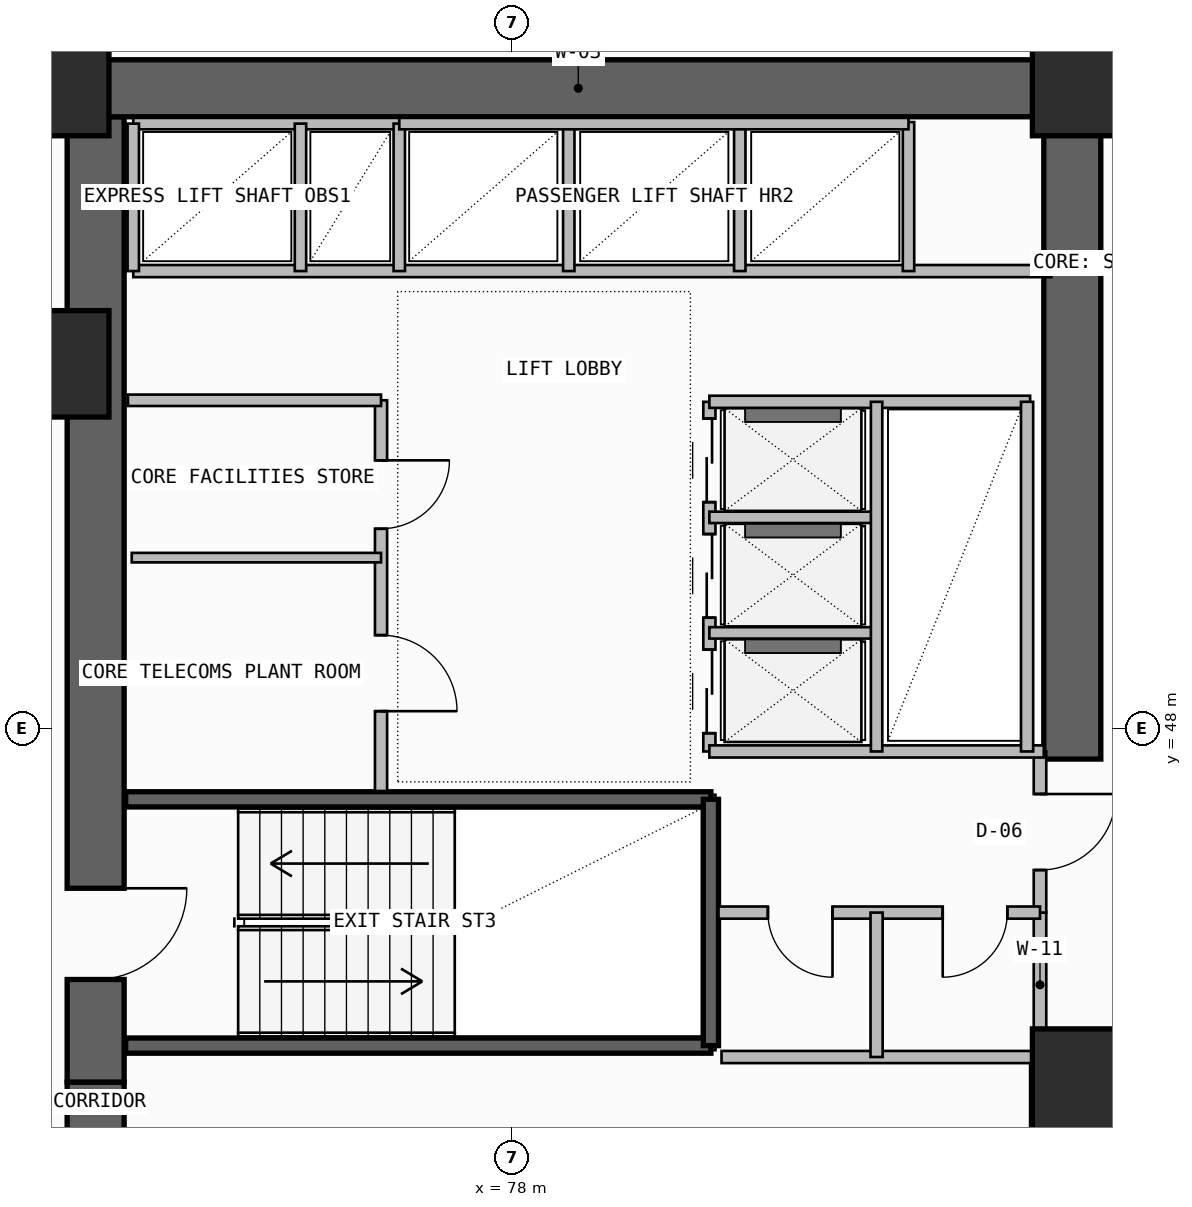
"""IFC4 building model, lengths in metres.
Left out: names, types, materials, properties, quantities, classifications, styles, units other than length and angle.
Written with IfcOpenShell. Run it as: python <this file> out.ifc"""

import sys

from ifc_helpers import new_model, si_unit, direction, frame, frame_2d, origin, origin_2d, place, context, subcontext, project, spatial, rectangle, extrude, element, fill, save


model = new_model("IFC4")
c1 = context("Model", 3, precision=1e-05, world=origin(), true_north=direction((0.0, 1.0)))
c2 = subcontext(c1, "Body", "Model", "MODEL_VIEW")
j1 = project(units=[si_unit("LENGTHUNIT", "METRE"), si_unit("PLANEANGLEUNIT", "RADIAN")], contexts=[c1])
p1 = place(None, origin())
s1 = spatial("IfcSite", under=j1, at=p1, CompositionType="ELEMENT")
p2 = place(p1, origin())
s2 = spatial("IfcBuilding", under=s1, at=p2, CompositionType="ELEMENT")
p3 = place(p2, frame((0.0, 0.0, 164.7)))
s3 = spatial("IfcBuildingStorey", under=s2, at=p3, CompositionType="ELEMENT", Elevation=164.7)
p4 = place(p3, frame((72.525, 35.5, -0.4), z_axis=(0.0, 0.0, 1.0), x_axis=(0.0, 1.0, 0.0)))
e1 = element("IfcWall", 1, at=p4, inside=s3, PredefinedType="SHEAR", context=c2, shape_type="SweptSolid", body=[
    extrude(rectangle(XDim=7.85, YDim=0.75, at=frame_2d((3.925, 0.0))), origin(), (0.0, 0.0, 1.0), 3.74),
])
p5 = place(p4, frame((1.45, 0.0, 0.4)))
e2 = element("IfcOpeningElement", 2, at=p5, cuts=e1, PredefinedType="OPENING", context=c2, shape_type="SweptSolid", body=[
    extrude(rectangle(XDim=1.2, YDim=2.2, at=frame_2d((0.6, 1.1))), frame((0.0, 0.385, 0.0), z_axis=(0.0, -1.0, 0.0), x_axis=(1.0, 0.0, 0.0)), (0.0, 0.0, 1.0), 0.77),
])
p6 = place(p3, frame((72.525, 43.35, -0.4), z_axis=(0.0, 0.0, 1.0), x_axis=(0.0, 1.0, 0.0)))
e3 = element("IfcWall", 3, at=p6, inside=s3, PredefinedType="SHEAR", context=c2, shape_type="SweptSolid", body=[
    extrude(rectangle(XDim=12.7, YDim=0.75, at=frame_2d((6.35, 0.0))), origin(), (0.0, 0.0, 1.0), 3.74),
])
p7 = place(p6, frame((1.35, 0.0, 0.4)))
e4 = element("IfcOpeningElement", 4, at=p7, cuts=e3, PredefinedType="OPENING", context=c2, shape_type="SweptSolid", body=[
    extrude(rectangle(XDim=1.2, YDim=2.2, at=frame_2d((0.6, 1.1))), frame((0.0, 0.385, 0.0), z_axis=(0.0, -1.0, 0.0), x_axis=(1.0, 0.0, 0.0)), (0.0, 0.0, 1.0), 0.77),
])
p8 = place(p3, frame((72.0, 56.425, -0.4), z_axis=(0.0, 0.0, 1.0), x_axis=(1.0, 0.0, 0.0)))
e5 = element("IfcWall", 5, at=p8, inside=s3, PredefinedType="SHEAR", context=c2, shape_type="SweptSolid", body=[
    extrude(rectangle(XDim=13.75, YDim=0.75, at=frame_2d((6.875, 0.0))), origin(), (0.0, 0.0, 1.0), 3.74),
])
p9 = place(p3, frame((85.375, 47.6, -0.4), z_axis=(0.0, 0.0, 1.0), x_axis=(0.0, 1.0, 0.0)))
e6 = element("IfcWall", 6, at=p9, inside=s3, PredefinedType="SHEAR", context=c2, shape_type="SweptSolid", body=[
    extrude(rectangle(XDim=8.45, YDim=0.75, at=frame_2d((4.225, 0.0))), origin(), (0.0, 0.0, 1.0), 3.74),
])
for number, where, z_axis, x_axis in (
    (7, (85.55, 43.35, 0.0), (0.0, 0.0, 1.0), (1.0, 0.0, 0.0)),
    (8, (72.0, 52.8, 0.0), (0.0, 0.0, 1.0), (1.0, 0.0, 0.0)),
    (9, (72.0, 56.5, 0.0), (0.0, 0.0, 1.0), (1.0, 0.0, 0.0)),
    (10, (85.55, 56.5, 0.0), (0.0, 0.0, 1.0), (1.0, 0.0, 0.0)),
):
    element("IfcColumn", number, at=place(p3, frame(where, z_axis=z_axis, x_axis=x_axis)), inside=s3, PredefinedType="COLUMN", context=c2, shape_type="SweptSolid", body=[
        extrude(rectangle(XDim=1.4, YDim=1.4, at=origin_2d()), origin(), (0.0, 0.0, 1.0), 3.6),
    ])
p10 = place(p3, frame((84.92, 38.85, 0.0), z_axis=(0.0, 0.0, 1.0), x_axis=(0.0, 1.0, 0.0)))
e11 = element("IfcWall", 11, at=p10, inside=s3, PredefinedType="SOLIDWALL", context=c2, shape_type="SweptSolid", body=[
    extrude(rectangle(XDim=4.83, YDim=0.2, at=frame_2d((2.415, 0.0))), origin(), (0.0, 0.0, 1.0), 3.34),
])
p11 = place(p10, frame((1.25, 0.0, 0.0)))
e12 = element("IfcOpeningElement", 12, at=p11, cuts=e11, PredefinedType="OPENING", context=c2, shape_type="SweptSolid", body=[
    extrude(rectangle(XDim=1.1, YDim=2.2, at=frame_2d((0.55, 1.1))), frame((0.0, 0.11, 0.0), z_axis=(0.0, -1.0, 0.0), x_axis=(1.0, 0.0, 0.0)), (0.0, 0.0, 1.0), 0.22),
])
for number, where, z_axis, x_axis in (
    (13, (72.92, 43.83, -0.4), (0.0, 0.0, 1.0), (1.0, 0.0, 0.0)),
    (14, (72.92, 47.07, -0.4), (0.0, 0.0, 1.0), (1.0, 0.0, 0.0)),
):
    element("IfcWall", number, at=place(p3, frame(where, z_axis=z_axis, x_axis=x_axis)), inside=s3, PredefinedType="SOLIDWALL", context=c2, shape_type="SweptSolid", body=[
        extrude(rectangle(XDim=7.7, YDim=0.2, at=frame_2d((3.85, 0.0))), origin(), (0.0, 0.0, 1.0), 3.74),
    ])
p12 = place(p3, frame((80.62, 43.83, -0.4), z_axis=(0.0, 0.0, 1.0), x_axis=(0.0, 1.0, 0.0)))
e15 = element("IfcWall", 15, at=p12, inside=s3, PredefinedType="SOLIDWALL", context=c2, shape_type="SweptSolid", body=[
    extrude(rectangle(XDim=3.24, YDim=0.2, at=frame_2d((1.62, 0.0))), origin(), (0.0, 0.0, 1.0), 3.74),
])
p13 = place(p3, frame((84.95, 43.68, 0.0), z_axis=(0.0, 0.0, 1.0), x_axis=(0.0, 1.0, 0.0)))
e16 = element("IfcWall", 16, at=p13, inside=s3, PredefinedType="PLUMBINGWALL", context=c2, shape_type="SweptSolid", body=[
    extrude(rectangle(XDim=1.9, YDim=0.165, at=frame_2d((0.95, 0.0))), origin(), (0.0, 0.0, 1.0), 3.34),
])
p14 = place(p3, frame((84.95, 45.58, 0.0), z_axis=(0.0, 0.0, 1.0), x_axis=(0.0, 1.0, 0.0)))
e17 = element("IfcWall", 17, at=p14, inside=s3, PredefinedType="PARTITIONING", context=c2, shape_type="SweptSolid", body=[
    extrude(rectangle(XDim=2.12, YDim=0.165, at=frame_2d((1.06, 0.0))), origin(), (0.0, 0.0, 1.0), 3.34),
])
p15 = place(p14, frame((0.56, 0.0, 0.0)))
e18 = element("IfcOpeningElement", 18, at=p15, cuts=e17, PredefinedType="OPENING", context=c2, shape_type="SweptSolid", body=[
    extrude(rectangle(XDim=1.0, YDim=2.2, at=frame_2d((0.5, 1.1))), frame((0.0, 0.093, 0.0), z_axis=(0.0, -1.0, 0.0), x_axis=(1.0, 0.0, 0.0)), (0.0, 0.0, 1.0), 0.185),
])
p16 = place(p3, frame((80.72, 45.58, 0.0), z_axis=(0.0, 0.0, 1.0), x_axis=(1.0, 0.0, 0.0)))
e19 = element("IfcWall", 19, at=p16, inside=s3, PredefinedType="PLUMBINGWALL", context=c2, shape_type="SweptSolid", body=[
    extrude(rectangle(XDim=4.23, YDim=0.16, at=frame_2d((2.115, 0.0))), origin(), (0.0, 0.0, 1.0), 3.34),
])
p17 = place(p16, frame((0.65, 0.0, 0.0)))
e20 = element("IfcOpeningElement", 20, at=p17, cuts=e19, PredefinedType="OPENING", context=c2, shape_type="SweptSolid", body=[
    extrude(rectangle(XDim=0.85, YDim=2.05, at=frame_2d((0.425, 1.025))), frame((0.0, 0.09, 0.0), z_axis=(0.0, -1.0, 0.0), x_axis=(1.0, 0.0, 0.0)), (0.0, 0.0, 1.0), 0.18),
])
p18 = place(p16, frame((2.95, 0.0, 0.0)))
e21 = element("IfcOpeningElement", 21, at=p18, cuts=e19, PredefinedType="OPENING", context=c2, shape_type="SweptSolid", body=[
    extrude(rectangle(XDim=0.85, YDim=2.05, at=frame_2d((0.425, 1.025))), frame((0.0, 0.09, 0.0), z_axis=(0.0, -1.0, 0.0), x_axis=(1.0, 0.0, 0.0)), (0.0, 0.0, 1.0), 0.18),
])
p19 = place(p3, frame((80.76, 43.68, 0.0), z_axis=(0.0, 0.0, 1.0), x_axis=(1.0, 0.0, 0.0)))
e22 = element("IfcWall", 22, at=p19, inside=s3, PredefinedType="PLUMBINGWALL", context=c2, shape_type="SweptSolid", body=[
    extrude(rectangle(XDim=4.19, YDim=0.16, at=frame_2d((2.095, 0.0))), origin(), (0.0, 0.0, 1.0), 3.34),
])
p20 = place(p3, frame((82.8, 43.68, 0.0), z_axis=(0.0, 0.0, 1.0), x_axis=(0.0, 1.0, 0.0)))
e23 = element("IfcWall", 23, at=p20, inside=s3, PredefinedType="PLUMBINGWALL", context=c2, shape_type="SweptSolid", body=[
    extrude(rectangle(XDim=1.9, YDim=0.16, at=frame_2d((0.95, 0.0))), origin(), (0.0, 0.0, 1.0), 3.34),
])
p21 = place(p3, frame((76.28, 47.18, 0.0), z_axis=(0.0, 0.0, 1.0), x_axis=(0.0, 1.0, 0.0)))
e24 = element("IfcWall", 24, at=p21, inside=s3, PredefinedType="SOLIDWALL", context=c2, shape_type="SweptSolid", body=[
    extrude(rectangle(XDim=5.14, YDim=0.16, at=frame_2d((2.57, 0.0))), origin(), (0.0, 0.0, 1.0), 3.34),
])
p22 = place(p21, frame((1.05, 0.0, 0.0)))
e25 = element("IfcOpeningElement", 25, at=p22, cuts=e24, PredefinedType="OPENING", context=c2, shape_type="SweptSolid", body=[
    extrude(rectangle(XDim=1.0, YDim=2.2, at=frame_2d((0.5, 1.1))), frame((0.0, 0.09, 0.0), z_axis=(0.0, -1.0, 0.0), x_axis=(1.0, 0.0, 0.0)), (0.0, 0.0, 1.0), 0.18),
])
p23 = place(p21, frame((3.45, 0.0, 0.0)))
e26 = element("IfcOpeningElement", 26, at=p23, cuts=e24, PredefinedType="OPENING", context=c2, shape_type="SweptSolid", body=[
    extrude(rectangle(XDim=0.9, YDim=2.1, at=frame_2d((0.45, 1.05))), frame((0.0, 0.09, 0.0), z_axis=(0.0, -1.0, 0.0), x_axis=(1.0, 0.0, 0.0)), (0.0, 0.0, 1.0), 0.18),
])
p24 = place(p3, frame((72.95, 52.32, 0.0), z_axis=(0.0, 0.0, 1.0), x_axis=(1.0, 0.0, 0.0)))
e27 = element("IfcWall", 27, at=p24, inside=s3, PredefinedType="SOLIDWALL", context=c2, shape_type="SweptSolid", body=[
    extrude(rectangle(XDim=3.33, YDim=0.15, at=frame_2d((1.665, 0.0))), origin(), (0.0, 0.0, 1.0), 3.34),
])
p25 = place(p3, frame((73.0, 50.25, 0.0), z_axis=(0.0, 0.0, 1.0), x_axis=(1.0, 0.0, 0.0)))
e28 = element("IfcWall", 28, at=p25, inside=s3, PredefinedType="PARTITIONING", context=c2, shape_type="SweptSolid", body=[
    extrude(rectangle(XDim=3.28, YDim=0.125, at=frame_2d((1.64, 0.0))), origin(), (0.0, 0.0, 1.0), 3.34),
])
p26 = place(p3, frame((80.6, 47.7, 0.0), z_axis=(0.0, 0.0, 1.0), x_axis=(0.0, 1.0, 0.0)))
e29 = element("IfcWall", 29, at=p26, inside=s3, PredefinedType="SOLIDWALL", context=c2, shape_type="SweptSolid", body=[
    extrude(rectangle(XDim=4.6, YDim=0.16, at=frame_2d((2.3, 0.0))), origin(), (0.0, 0.0, 1.0), 3.34),
])
p27 = place(p26, frame((0.24, 0.0, 0.0)))
e30 = element("IfcOpeningElement", 30, at=p27, cuts=e29, PredefinedType="OPENING", context=c2, shape_type="SweptSolid", body=[
    extrude(rectangle(XDim=1.1, YDim=2.25, at=frame_2d((0.55, 1.125))), frame((0.0, 0.09, 0.0), z_axis=(0.0, -1.0, 0.0), x_axis=(1.0, 0.0, 0.0)), (0.0, 0.0, 1.0), 0.18),
])
p28 = place(p26, frame((1.76, 0.0, 0.0)))
e31 = element("IfcOpeningElement", 31, at=p28, cuts=e29, PredefinedType="OPENING", context=c2, shape_type="SweptSolid", body=[
    extrude(rectangle(XDim=1.1, YDim=2.25, at=frame_2d((0.55, 1.125))), frame((0.0, 0.09, 0.0), z_axis=(0.0, -1.0, 0.0), x_axis=(1.0, 0.0, 0.0)), (0.0, 0.0, 1.0), 0.18),
])
p29 = place(p26, frame((3.28, 0.0, 0.0)))
e32 = element("IfcOpeningElement", 32, at=p29, cuts=e29, PredefinedType="OPENING", context=c2, shape_type="SweptSolid", body=[
    extrude(rectangle(XDim=1.1, YDim=2.25, at=frame_2d((0.55, 1.125))), frame((0.0, 0.09, 0.0), z_axis=(0.0, -1.0, 0.0), x_axis=(1.0, 0.0, 0.0)), (0.0, 0.0, 1.0), 0.18),
])
p30 = place(p3, frame((80.6, 47.7, 0.0), z_axis=(0.0, 0.0, 1.0), x_axis=(1.0, 0.0, 0.0)))
e33 = element("IfcWall", 33, at=p30, inside=s3, PredefinedType="SOLIDWALL", context=c2, shape_type="SweptSolid", body=[
    extrude(rectangle(XDim=4.4, YDim=0.16, at=frame_2d((2.2, 0.0))), origin(), (0.0, 0.0, 1.0), 3.34),
])
p31 = place(p3, frame((80.6, 52.3, 0.0), z_axis=(0.0, 0.0, 1.0), x_axis=(1.0, 0.0, 0.0)))
e34 = element("IfcWall", 34, at=p31, inside=s3, PredefinedType="SOLIDWALL", context=c2, shape_type="SweptSolid", body=[
    extrude(rectangle(XDim=4.22, YDim=0.16, at=frame_2d((2.11, 0.0))), origin(), (0.0, 0.0, 1.0), 3.34),
])
for number, where, z_axis, x_axis in (
    (35, (80.6, 49.26, 0.0), (0.0, 0.0, 1.0), (1.0, 0.0, 0.0)),
    (36, (80.6, 50.78, 0.0), (0.0, 0.0, 1.0), (1.0, 0.0, 0.0)),
):
    element("IfcWall", number, at=place(p3, frame(where, z_axis=z_axis, x_axis=x_axis)), inside=s3, PredefinedType="PLUMBINGWALL", context=c2, shape_type="SweptSolid", body=[
        extrude(rectangle(XDim=2.2, YDim=0.15, at=frame_2d((1.1, 0.0))), origin(), (0.0, 0.0, 1.0), 3.34),
    ])
p32 = place(p3, frame((82.8, 47.7, 0.0), z_axis=(0.0, 0.0, 1.0), x_axis=(0.0, 1.0, 0.0)))
e37 = element("IfcWall", 37, at=p32, inside=s3, PredefinedType="PLUMBINGWALL", context=c2, shape_type="SweptSolid", body=[
    extrude(rectangle(XDim=4.6, YDim=0.15, at=frame_2d((2.3, 0.0))), origin(), (0.0, 0.0, 1.0), 3.34),
])
p33 = place(p3, frame((84.78, 47.7, 0.0), z_axis=(0.0, 0.0, 1.0), x_axis=(0.0, 1.0, 0.0)))
e38 = element("IfcWall", 38, at=p33, inside=s3, PredefinedType="SOLIDWALL", context=c2, shape_type="SweptSolid", body=[
    extrude(rectangle(XDim=4.6, YDim=0.16, at=frame_2d((2.3, 0.0))), origin(), (0.0, 0.0, 1.0), 3.34),
])
p34 = place(p3, frame((73.02, 54.02, 0.0), z_axis=(0.0, 0.0, 1.0), x_axis=(1.0, 0.0, 0.0)))
e39 = element("IfcWall", 39, at=p34, inside=s3, PredefinedType="SOLIDWALL", context=c2, shape_type="SweptSolid", body=[
    extrude(rectangle(XDim=12.08, YDim=0.16, at=frame_2d((6.04, 0.0))), origin(), (0.0, 0.0, 1.0), 3.34),
])
p35 = place(p3, frame((73.02, 55.96, 0.0), z_axis=(0.0, 0.0, 1.0), x_axis=(1.0, 0.0, 0.0)))
e40 = element("IfcWall", 40, at=p35, inside=s3, PredefinedType="SOLIDWALL", context=c2, shape_type="SweptSolid", body=[
    extrude(rectangle(XDim=3.5, YDim=0.15, at=frame_2d((1.75, 0.0))), origin(), (0.0, 0.0, 1.0), 3.34),
])
p36 = place(p3, frame((73.02, 54.02, 0.0), z_axis=(0.0, 0.0, 1.0), x_axis=(0.0, 1.0, 0.0)))
e41 = element("IfcWall", 41, at=p36, inside=s3, PredefinedType="PLUMBINGWALL", context=c2, shape_type="SweptSolid", body=[
    extrude(rectangle(XDim=1.94, YDim=0.15, at=frame_2d((0.97, 0.0))), origin(), (0.0, 0.0, 1.0), 3.34),
])
p37 = place(p3, frame((76.52, 54.02, 0.0), z_axis=(0.0, 0.0, 1.0), x_axis=(0.0, 1.0, 0.0)))
e42 = element("IfcWall", 42, at=p37, inside=s3, PredefinedType="SOLIDWALL", context=c2, shape_type="SweptSolid", body=[
    extrude(rectangle(XDim=1.94, YDim=0.15, at=frame_2d((0.97, 0.0))), origin(), (0.0, 0.0, 1.0), 3.34),
])
p38 = place(p3, frame((75.22, 54.02, 0.0), z_axis=(0.0, 0.0, 1.0), x_axis=(0.0, 1.0, 0.0)))
e43 = element("IfcWall", 43, at=p38, inside=s3, PredefinedType="PLUMBINGWALL", context=c2, shape_type="SweptSolid", body=[
    extrude(rectangle(XDim=1.94, YDim=0.15, at=frame_2d((0.97, 0.0))), origin(), (0.0, 0.0, 1.0), 3.34),
])
for number, where, z_axis, x_axis in (
    (44, (78.75, 54.02, 0.0), (0.0, 0.0, 1.0), (0.0, 1.0, 0.0)),
    (45, (81.0, 54.02, 0.0), (0.0, 0.0, 1.0), (0.0, 1.0, 0.0)),
):
    element("IfcWall", number, at=place(p3, frame(where, z_axis=z_axis, x_axis=x_axis)), inside=s3, PredefinedType="PLUMBINGWALL", context=c2, shape_type="SweptSolid", body=[
        extrude(rectangle(XDim=1.96, YDim=0.15, at=frame_2d((0.98, 0.0))), origin(), (0.0, 0.0, 1.0), 3.34),
    ])
p39 = place(p3, frame((83.22, 54.02, 0.0), z_axis=(0.0, 0.0, 1.0), x_axis=(0.0, 1.0, 0.0)))
e46 = element("IfcWall", 46, at=p39, inside=s3, PredefinedType="SOLIDWALL", context=c2, shape_type="SweptSolid", body=[
    extrude(rectangle(XDim=1.96, YDim=0.15, at=frame_2d((0.98, 0.0))), origin(), (0.0, 0.0, 1.0), 3.34),
])
p40 = place(p3, frame((76.52, 55.96, 0.0), z_axis=(0.0, 0.0, 1.0), x_axis=(1.0, 0.0, 0.0)))
e47 = element("IfcWall", 47, at=p40, inside=s3, PredefinedType="SOLIDWALL", context=c2, shape_type="SweptSolid", body=[
    extrude(rectangle(XDim=6.7, YDim=0.15, at=frame_2d((3.35, 0.0))), origin(), (0.0, 0.0, 1.0), 3.34),
])
p41 = place(p7, frame((1.2, 0.0, 0.0), z_axis=(0.0, 0.0, 1.0), x_axis=(-1.0, 0.0, 0.0)))
e48 = element("IfcDoor", 48, at=p41, inside=s3, OperationType="SINGLE_SWING_LEFT", PredefinedType="USERDEFINED", context=c2, shape_type="SweptSolid", body=[
    extrude(rectangle(XDim=1.2, YDim=2.2, at=frame_2d((0.6, 1.1))), frame((0.0, 0.025, 0.0), z_axis=(0.0, -1.0, 0.0), x_axis=(1.0, 0.0, 0.0)), (0.0, 0.0, 1.0), 0.05),
])
fill(e4, e48)
p42 = place(p15, frame((1.0, 0.0, 0.0), z_axis=(0.0, 0.0, 1.0), x_axis=(-1.0, 0.0, 0.0)))
e49 = element("IfcDoor", 49, at=p42, inside=s3, OperationType="SINGLE_SWING_LEFT", PredefinedType="DOOR", context=c2, shape_type="SweptSolid", body=[
    extrude(rectangle(XDim=1.0, YDim=2.2, at=frame_2d((0.5, 1.1))), frame((0.0, 0.025, 0.0), z_axis=(0.0, -1.0, 0.0), x_axis=(1.0, 0.0, 0.0)), (0.0, 0.0, 1.0), 0.05),
])
fill(e18, e49)
p43 = place(p17, frame((0.85, 0.0, 0.0), z_axis=(0.0, 0.0, 1.0), x_axis=(-1.0, 0.0, 0.0)))
e50 = element("IfcDoor", 50, at=p43, inside=s3, OperationType="SINGLE_SWING_LEFT", PredefinedType="DOOR", context=c2, shape_type="SweptSolid", body=[
    extrude(rectangle(XDim=0.85, YDim=2.05, at=frame_2d((0.425, 1.025))), frame((0.0, 0.025, 0.0), z_axis=(0.0, -1.0, 0.0), x_axis=(1.0, 0.0, 0.0)), (0.0, 0.0, 1.0), 0.05),
])
fill(e20, e50)
p44 = place(p18, frame((0.85, 0.0, 0.0), z_axis=(0.0, 0.0, 1.0), x_axis=(-1.0, 0.0, 0.0)))
e51 = element("IfcDoor", 51, at=p44, inside=s3, OperationType="SINGLE_SWING_RIGHT", PredefinedType="DOOR", context=c2, shape_type="SweptSolid", body=[
    extrude(rectangle(XDim=0.85, YDim=2.05, at=frame_2d((0.425, 1.025))), frame((0.0, 0.025, 0.0), z_axis=(0.0, -1.0, 0.0), x_axis=(1.0, 0.0, 0.0)), (0.0, 0.0, 1.0), 0.05),
])
fill(e21, e51)
p45 = place(p22, frame((1.0, 0.0, 0.0), z_axis=(0.0, 0.0, 1.0), x_axis=(-1.0, 0.0, 0.0)))
e52 = element("IfcDoor", 52, at=p45, inside=s3, OperationType="SINGLE_SWING_RIGHT", PredefinedType="DOOR", context=c2, shape_type="SweptSolid", body=[
    extrude(rectangle(XDim=1.0, YDim=2.2, at=frame_2d((0.5, 1.1))), frame((0.0, 0.025, 0.0), z_axis=(0.0, -1.0, 0.0), x_axis=(1.0, 0.0, 0.0)), (0.0, 0.0, 1.0), 0.05),
])
fill(e25, e52)
p46 = place(p23, frame((0.9, 0.0, 0.0), z_axis=(0.0, 0.0, 1.0), x_axis=(-1.0, 0.0, 0.0)))
e53 = element("IfcDoor", 53, at=p46, inside=s3, OperationType="SINGLE_SWING_LEFT", PredefinedType="DOOR", context=c2, shape_type="SweptSolid", body=[
    extrude(rectangle(XDim=0.9, YDim=2.1, at=frame_2d((0.45, 1.05))), frame((0.0, 0.025, 0.0), z_axis=(0.0, -1.0, 0.0), x_axis=(1.0, 0.0, 0.0)), (0.0, 0.0, 1.0), 0.05),
])
fill(e26, e53)
p47 = place(p27, frame((1.1, 0.0, 0.0), z_axis=(0.0, 0.0, 1.0), x_axis=(-1.0, 0.0, 0.0)))
e54 = element("IfcDoor", 54, at=p47, inside=s3, OperationType="DOUBLE_DOOR_SLIDING", PredefinedType="DOOR", context=c2, shape_type="SweptSolid", body=[
    extrude(rectangle(XDim=1.1, YDim=2.25, at=frame_2d((0.55, 1.125))), frame((0.0, 0.025, 0.0), z_axis=(0.0, -1.0, 0.0), x_axis=(1.0, 0.0, 0.0)), (0.0, 0.0, 1.0), 0.05),
])
fill(e30, e54)
p48 = place(p28, frame((1.1, 0.0, 0.0), z_axis=(0.0, 0.0, 1.0), x_axis=(-1.0, 0.0, 0.0)))
e55 = element("IfcDoor", 55, at=p48, inside=s3, OperationType="DOUBLE_DOOR_SLIDING", PredefinedType="DOOR", context=c2, shape_type="SweptSolid", body=[
    extrude(rectangle(XDim=1.1, YDim=2.25, at=frame_2d((0.55, 1.125))), frame((0.0, 0.025, 0.0), z_axis=(0.0, -1.0, 0.0), x_axis=(1.0, 0.0, 0.0)), (0.0, 0.0, 1.0), 0.05),
])
fill(e31, e55)
p49 = place(p29, frame((1.1, 0.0, 0.0), z_axis=(0.0, 0.0, 1.0), x_axis=(-1.0, 0.0, 0.0)))
e56 = element("IfcDoor", 56, at=p49, inside=s3, OperationType="DOUBLE_DOOR_SLIDING", PredefinedType="DOOR", context=c2, shape_type="SweptSolid", body=[
    extrude(rectangle(XDim=1.1, YDim=2.25, at=frame_2d((0.55, 1.125))), frame((0.0, 0.025, 0.0), z_axis=(0.0, -1.0, 0.0), x_axis=(1.0, 0.0, 0.0)), (0.0, 0.0, 1.0), 0.05),
])
fill(e32, e56)
save(model, sys.argv[1])
